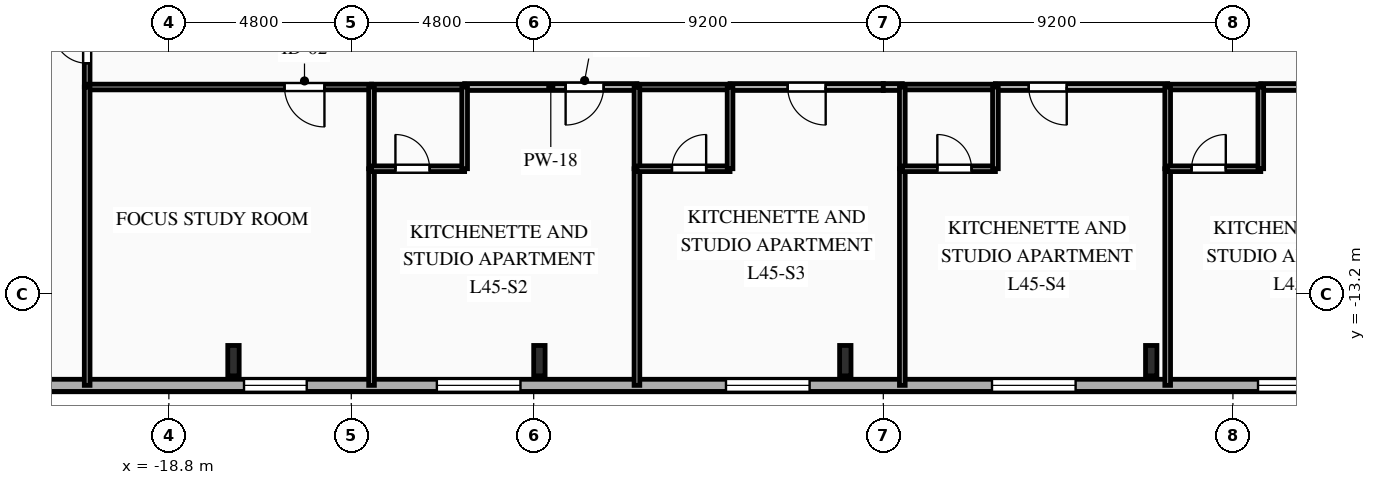
"""IFC4 building model, lengths in metres.
Left out: names, types, materials, properties, quantities, classifications, styles, units other than length and angle.
Written with IfcOpenShell. Run it as: python <this file> out.ifc"""

import sys

from ifc_helpers import new_model, si_unit, direction, frame, frame_2d, origin, origin_2d, place, context, subcontext, project, spatial, rectangle, i_section, extrude, element, fill, save


model = new_model("IFC4")
c1 = context("Model", 3, precision=1e-05, world=origin(), true_north=direction((0.0, 1.0)))
c2 = subcontext(c1, "Body", "Model", "MODEL_VIEW")
j1 = project(units=[si_unit("LENGTHUNIT", "METRE"), si_unit("PLANEANGLEUNIT", "RADIAN")], contexts=[c1])
p1 = place(None, origin())
s1 = spatial("IfcSite", under=j1, at=p1, CompositionType="ELEMENT")
p2 = place(p1, origin())
s2 = spatial("IfcBuilding", under=s1, at=p2, CompositionType="ELEMENT")
p3 = place(p2, frame((0.0, 0.0, 161.15)))
s3 = spatial("IfcBuildingStorey", under=s2, at=p3, CompositionType="ELEMENT", Elevation=161.15)
for number, where, z_axis, x_axis in (
    (1, (-17.1, -14.95, 0.0), (0.0, 0.0, 1.0), (1.0, 0.0, 0.0)),
    (2, (-9.05, -14.95, 0.0), (0.0, 0.0, 1.0), (1.0, 0.0, 0.0)),
    (3, (-1.0, -14.95, 0.0), (0.0, 0.0, 1.0), (1.0, 0.0, 0.0)),
    (4, (7.05, -14.95, 0.0), (0.0, 0.0, 1.0), (1.0, 0.0, 0.0)),
):
    element("IfcColumn", number, at=place(p3, frame(where, z_axis=z_axis, x_axis=x_axis)), inside=s3, PredefinedType="COLUMN", context=c2, shape_type="SweptSolid", body=[
        extrude(i_section(OverallWidth=0.3, OverallDepth=0.8, WebThickness=0.018, FlangeThickness=0.033, FilletRadius=0.03, at=origin_2d()), origin(), (0.0, 0.0, 1.0), 3.35),
    ])
p4 = place(p3, frame((23.8, -15.6, 0.0), z_axis=(0.0, 0.0, 1.0), x_axis=(-1.0, 0.0, 0.0)))
e5 = element("IfcWall", 5, at=p4, inside=s3, PredefinedType="SOLIDWALL", context=c2, shape_type="SweptSolid", body=[
    extrude(rectangle(XDim=49.6, YDim=0.32, at=frame_2d((24.8, 0.0))), origin(), (0.0, 0.0, 1.0), 3.04),
])
p5 = place(p4, frame((1.13, 0.0, 0.85)))
e6 = element("IfcOpeningElement", 6, at=p5, cuts=e5, PredefinedType="OPENING", context=c2, shape_type="SweptSolid", body=[
    extrude(rectangle(XDim=1.1, YDim=1.85, at=frame_2d((0.55, 0.925))), frame((0.0, 0.17, 0.0), z_axis=(0.0, -1.0, 0.0), x_axis=(1.0, 0.0, 0.0)), (0.0, 0.0, 1.0), 0.34),
])
p6 = place(p4, frame((5.295, 0.0, 0.85)))
e7 = element("IfcOpeningElement", 7, at=p6, cuts=e5, PredefinedType="OPENING", context=c2, shape_type="SweptSolid", body=[
    extrude(rectangle(XDim=1.65, YDim=1.85, at=frame_2d((0.825, 0.925))), frame((0.0, 0.17, 0.0), z_axis=(0.0, -1.0, 0.0), x_axis=(1.0, 0.0, 0.0)), (0.0, 0.0, 1.0), 0.34),
])
p7 = place(p4, frame((11.74, 0.0, 0.85)))
e8 = element("IfcOpeningElement", 8, at=p7, cuts=e5, PredefinedType="OPENING", context=c2, shape_type="SweptSolid", body=[
    extrude(rectangle(XDim=2.2, YDim=1.85, at=frame_2d((1.1, 0.925))), frame((0.0, 0.17, 0.0), z_axis=(0.0, -1.0, 0.0), x_axis=(1.0, 0.0, 0.0)), (0.0, 0.0, 1.0), 0.34),
])
p8 = place(p4, frame((18.74, 0.0, 0.85)))
e9 = element("IfcOpeningElement", 9, at=p8, cuts=e5, PredefinedType="OPENING", context=c2, shape_type="SweptSolid", body=[
    extrude(rectangle(XDim=2.2, YDim=1.85, at=frame_2d((1.1, 0.925))), frame((0.0, 0.17, 0.0), z_axis=(0.0, -1.0, 0.0), x_axis=(1.0, 0.0, 0.0)), (0.0, 0.0, 1.0), 0.34),
])
p9 = place(p4, frame((25.74, 0.0, 0.85)))
e10 = element("IfcOpeningElement", 10, at=p9, cuts=e5, PredefinedType="OPENING", context=c2, shape_type="SweptSolid", body=[
    extrude(rectangle(XDim=2.2, YDim=1.85, at=frame_2d((1.1, 0.925))), frame((0.0, 0.17, 0.0), z_axis=(0.0, -1.0, 0.0), x_axis=(1.0, 0.0, 0.0)), (0.0, 0.0, 1.0), 0.34),
])
p10 = place(p4, frame((33.348, 0.0, 0.85)))
e11 = element("IfcOpeningElement", 11, at=p10, cuts=e5, PredefinedType="OPENING", context=c2, shape_type="SweptSolid", body=[
    extrude(rectangle(XDim=2.2, YDim=1.85, at=frame_2d((1.1, 0.925))), frame((0.0, 0.17, 0.0), z_axis=(0.0, -1.0, 0.0), x_axis=(1.0, 0.0, 0.0)), (0.0, 0.0, 1.0), 0.34),
])
p11 = place(p4, frame((38.972, 0.0, 0.85)))
e12 = element("IfcOpeningElement", 12, at=p11, cuts=e5, PredefinedType="OPENING", context=c2, shape_type="SweptSolid", body=[
    extrude(rectangle(XDim=1.65, YDim=1.85, at=frame_2d((0.825, 0.925))), frame((0.0, 0.17, 0.0), z_axis=(0.0, -1.0, 0.0), x_axis=(1.0, 0.0, 0.0)), (0.0, 0.0, 1.0), 0.34),
])
p12 = place(p4, frame((45.895, 0.0, 0.85)))
e13 = element("IfcOpeningElement", 13, at=p12, cuts=e5, PredefinedType="OPENING", context=c2, shape_type="SweptSolid", body=[
    extrude(rectangle(XDim=1.65, YDim=1.85, at=frame_2d((0.825, 0.925))), frame((0.0, 0.17, 0.0), z_axis=(0.0, -1.0, 0.0), x_axis=(1.0, 0.0, 0.0)), (0.0, 0.0, 1.0), 0.34),
])
p13 = place(p3, frame((-20.95, -7.75, 0.0), z_axis=(0.0, 0.0, 1.0), x_axis=(0.0, 1.0, 0.0)))
e14 = element("IfcWall", 14, at=p13, inside=s3, PredefinedType="PARTITIONING", context=c2, shape_type="SweptSolid", body=[
    extrude(rectangle(XDim=2.15, YDim=0.15, at=frame_2d((1.075, 0.0))), origin(), (0.0, 0.0, 1.0), 3.04),
])
p14 = place(p13, frame((0.625, 0.0, 0.0)))
e15 = element("IfcOpeningElement", 15, at=p14, cuts=e14, PredefinedType="OPENING", context=c2, shape_type="SweptSolid", body=[
    extrude(rectangle(XDim=0.9, YDim=2.1, at=frame_2d((0.45, 1.05))), frame((0.0, 0.085, 0.0), z_axis=(0.0, -1.0, 0.0), x_axis=(1.0, 0.0, 0.0)), (0.0, 0.0, 1.0), 0.17),
])
p15 = place(p3, frame((-13.467, -7.75, 0.0), z_axis=(0.0, 0.0, 1.0), x_axis=(-1.0, 0.0, 0.0)))
e16 = element("IfcWall", 16, at=p15, inside=s3, PredefinedType="PARTITIONING", context=c2, shape_type="SweptSolid", body=[
    extrude(rectangle(XDim=7.483, YDim=0.15, at=frame_2d((3.741, 0.0))), origin(), (0.0, 0.0, 1.0), 3.04),
])
p16 = place(p15, frame((1.239, 0.0, 0.0)))
e17 = element("IfcOpeningElement", 17, at=p16, cuts=e16, PredefinedType="OPENING", context=c2, shape_type="SweptSolid", body=[
    extrude(rectangle(XDim=1.05, YDim=2.15, at=frame_2d((0.525, 1.075))), frame((0.0, 0.085, 0.0), z_axis=(0.0, -1.0, 0.0), x_axis=(1.0, 0.0, 0.0)), (0.0, 0.0, 1.0), 0.17),
])
p17 = place(p3, frame((-6.483, -7.75, 0.0), z_axis=(0.0, 0.0, 1.0), x_axis=(-1.0, 0.0, 0.0)))
e18 = element("IfcWall", 18, at=p17, inside=s3, PredefinedType="PARTITIONING", context=c2, shape_type="SweptSolid", body=[
    extrude(rectangle(XDim=4.534, YDim=0.18, at=frame_2d((2.267, 0.0))), origin(), (0.0, 0.0, 1.0), 3.04),
])
p18 = place(p17, frame((0.877, 0.0, 0.0)))
e19 = element("IfcOpeningElement", 19, at=p18, cuts=e18, PredefinedType="OPENING", context=c2, shape_type="SweptSolid", body=[
    extrude(rectangle(XDim=1.0, YDim=2.15, at=frame_2d((0.5, 1.075))), frame((0.0, 0.1, 0.0), z_axis=(0.0, -1.0, 0.0), x_axis=(1.0, 0.0, 0.0)), (0.0, 0.0, 1.0), 0.2),
])
p19 = place(p3, frame((-11.017, -7.75, 0.0), z_axis=(0.0, 0.0, 1.0), x_axis=(-1.0, 0.0, 0.0)))
e20 = element("IfcWall", 20, at=p19, inside=s3, PredefinedType="PLUMBINGWALL", context=c2, shape_type="SweptSolid", body=[
    extrude(rectangle(XDim=2.45, YDim=0.15, at=frame_2d((1.225, 0.0))), origin(), (0.0, 0.0, 1.0), 3.04),
])
p20 = place(p3, frame((0.0, -7.75, 0.0), z_axis=(0.0, 0.0, 1.0), x_axis=(-1.0, 0.0, 0.0)))
e21 = element("IfcWall", 21, at=p20, inside=s3, PredefinedType="PARTITIONING", context=c2, shape_type="SweptSolid", body=[
    extrude(rectangle(XDim=4.033, YDim=0.18, at=frame_2d((2.017, 0.0))), origin(), (0.0, 0.0, 1.0), 3.04),
])
p21 = place(p20, frame((1.517, 0.0, 0.0)))
e22 = element("IfcOpeningElement", 22, at=p21, cuts=e21, PredefinedType="OPENING", context=c2, shape_type="SweptSolid", body=[
    extrude(rectangle(XDim=1.0, YDim=2.15, at=frame_2d((0.5, 1.075))), frame((0.0, 0.1, 0.0), z_axis=(0.0, -1.0, 0.0), x_axis=(1.0, 0.0, 0.0)), (0.0, 0.0, 1.0), 0.2),
])
p22 = place(p3, frame((-4.033, -7.75, 0.0), z_axis=(0.0, 0.0, 1.0), x_axis=(-1.0, 0.0, 0.0)))
e23 = element("IfcWall", 23, at=p22, inside=s3, PredefinedType="PLUMBINGWALL", context=c2, shape_type="SweptSolid", body=[
    extrude(rectangle(XDim=2.45, YDim=0.15, at=frame_2d((1.225, 0.0))), origin(), (0.0, 0.0, 1.0), 3.04),
])
p23 = place(p3, frame((0.5, -7.75, 0.0), z_axis=(0.0, 0.0, 1.0), x_axis=(-1.0, 0.0, 0.0)))
e24 = element("IfcWall", 24, at=p23, inside=s3, PredefinedType="PARTITIONING", context=c2, shape_type="SweptSolid", body=[
    extrude(rectangle(XDim=0.5, YDim=0.18, at=frame_2d((0.25, 0.0))), origin(), (0.0, 0.0, 1.0), 3.04),
])
p24 = place(p3, frame((7.483, -7.75, 0.0), z_axis=(0.0, 0.0, 1.0), x_axis=(-1.0, 0.0, 0.0)))
e25 = element("IfcWall", 25, at=p24, inside=s3, PredefinedType="PARTITIONING", context=c2, shape_type="SweptSolid", body=[
    extrude(rectangle(XDim=4.533, YDim=0.18, at=frame_2d((2.267, 0.0))), origin(), (0.0, 0.0, 1.0), 3.04),
])
p25 = place(p24, frame((2.656, 0.0, 0.0)))
e26 = element("IfcOpeningElement", 26, at=p25, cuts=e25, PredefinedType="OPENING", context=c2, shape_type="SweptSolid", body=[
    extrude(rectangle(XDim=1.0, YDim=2.15, at=frame_2d((0.5, 1.075))), frame((0.0, 0.1, 0.0), z_axis=(0.0, -1.0, 0.0), x_axis=(1.0, 0.0, 0.0)), (0.0, 0.0, 1.0), 0.2),
])
p26 = place(p3, frame((2.95, -7.75, 0.0), z_axis=(0.0, 0.0, 1.0), x_axis=(-1.0, 0.0, 0.0)))
e27 = element("IfcWall", 27, at=p26, inside=s3, PredefinedType="PLUMBINGWALL", context=c2, shape_type="SweptSolid", body=[
    extrude(rectangle(XDim=2.45, YDim=0.15, at=frame_2d((1.225, 0.0))), origin(), (0.0, 0.0, 1.0), 3.04),
])
p27 = place(p3, frame((14.467, -7.75, 0.0), z_axis=(0.0, 0.0, 1.0), x_axis=(-1.0, 0.0, 0.0)))
e28 = element("IfcWall", 28, at=p27, inside=s3, PredefinedType="PARTITIONING", context=c2, shape_type="SweptSolid", body=[
    extrude(rectangle(XDim=4.534, YDim=0.18, at=frame_2d((2.267, 0.0))), origin(), (0.0, 0.0, 1.0), 3.04),
])
p28 = place(p27, frame((0.877, 0.0, 0.0)))
e29 = element("IfcOpeningElement", 29, at=p28, cuts=e28, PredefinedType="OPENING", context=c2, shape_type="SweptSolid", body=[
    extrude(rectangle(XDim=1.0, YDim=2.15, at=frame_2d((0.5, 1.075))), frame((0.0, 0.1, 0.0), z_axis=(0.0, -1.0, 0.0), x_axis=(1.0, 0.0, 0.0)), (0.0, 0.0, 1.0), 0.2),
])
p29 = place(p3, frame((9.933, -7.75, 0.0), z_axis=(0.0, 0.0, 1.0), x_axis=(-1.0, 0.0, 0.0)))
e30 = element("IfcWall", 30, at=p29, inside=s3, PredefinedType="PLUMBINGWALL", context=c2, shape_type="SweptSolid", body=[
    extrude(rectangle(XDim=2.45, YDim=0.15, at=frame_2d((1.225, 0.0))), origin(), (0.0, 0.0, 1.0), 3.04),
])
p30 = place(p3, frame((-20.95, -7.75, 0.0), z_axis=(0.0, 0.0, 1.0), x_axis=(0.0, -1.0, 0.0)))
e31 = element("IfcWall", 31, at=p30, inside=s3, PredefinedType="PARTITIONING", context=c2, shape_type="SweptSolid", body=[
    extrude(rectangle(XDim=7.85, YDim=0.15, at=frame_2d((3.925, 0.0))), origin(), (0.0, 0.0, 1.0), 3.04),
])
p31 = place(p3, frame((-13.467, -9.9, 0.0), z_axis=(0.0, 0.0, 1.0), x_axis=(0.0, -1.0, 0.0)))
e32 = element("IfcWall", 32, at=p31, inside=s3, PredefinedType="PARTITIONING", context=c2, shape_type="SweptSolid", body=[
    extrude(rectangle(XDim=5.7, YDim=0.15, at=frame_2d((2.85, 0.0))), origin(), (0.0, 0.0, 1.0), 3.04),
])
p32 = place(p3, frame((-13.467, -7.75, 0.0), z_axis=(0.0, 0.0, 1.0), x_axis=(0.0, -1.0, 0.0)))
e33 = element("IfcWall", 33, at=p32, inside=s3, PredefinedType="PLUMBINGWALL", context=c2, shape_type="SweptSolid", body=[
    extrude(rectangle(XDim=2.15, YDim=0.15, at=frame_2d((1.075, 0.0))), origin(), (0.0, 0.0, 1.0), 3.04),
])
p33 = place(p3, frame((-13.467, -9.9, 0.0), z_axis=(0.0, 0.0, 1.0), x_axis=(1.0, 0.0, 0.0)))
e34 = element("IfcWall", 34, at=p33, inside=s3, PredefinedType="PLUMBINGWALL", context=c2, shape_type="SweptSolid", body=[
    extrude(rectangle(XDim=2.45, YDim=0.15, at=frame_2d((1.225, 0.0))), origin(), (0.0, 0.0, 1.0), 3.04),
])
p34 = place(p33, frame((0.629, 0.0, 0.0)))
e35 = element("IfcOpeningElement", 35, at=p34, cuts=e34, PredefinedType="OPENING", context=c2, shape_type="SweptSolid", body=[
    extrude(rectangle(XDim=0.9, YDim=2.1, at=frame_2d((0.45, 1.05))), frame((0.0, 0.085, 0.0), z_axis=(0.0, -1.0, 0.0), x_axis=(1.0, 0.0, 0.0)), (0.0, 0.0, 1.0), 0.17),
])
p35 = place(p3, frame((-11.017, -9.9, 0.0), z_axis=(0.0, 0.0, 1.0), x_axis=(0.0, 1.0, 0.0)))
e36 = element("IfcWall", 36, at=p35, inside=s3, PredefinedType="PLUMBINGWALL", context=c2, shape_type="SweptSolid", body=[
    extrude(rectangle(XDim=2.15, YDim=0.15, at=frame_2d((1.075, 0.0))), origin(), (0.0, 0.0, 1.0), 3.04),
])
p36 = place(p3, frame((-6.483, -9.9, 0.0), z_axis=(0.0, 0.0, 1.0), x_axis=(0.0, -1.0, 0.0)))
e37 = element("IfcWall", 37, at=p36, inside=s3, PredefinedType="PARTITIONING", context=c2, shape_type="SweptSolid", body=[
    extrude(rectangle(XDim=5.7, YDim=0.15, at=frame_2d((2.85, 0.0))), origin(), (0.0, 0.0, 1.0), 3.04),
])
p37 = place(p3, frame((-6.483, -7.75, 0.0), z_axis=(0.0, 0.0, 1.0), x_axis=(0.0, -1.0, 0.0)))
e38 = element("IfcWall", 38, at=p37, inside=s3, PredefinedType="PLUMBINGWALL", context=c2, shape_type="SweptSolid", body=[
    extrude(rectangle(XDim=2.15, YDim=0.15, at=frame_2d((1.075, 0.0))), origin(), (0.0, 0.0, 1.0), 3.04),
])
p38 = place(p3, frame((-6.483, -9.9, 0.0), z_axis=(0.0, 0.0, 1.0), x_axis=(1.0, 0.0, 0.0)))
e39 = element("IfcWall", 39, at=p38, inside=s3, PredefinedType="PLUMBINGWALL", context=c2, shape_type="SweptSolid", body=[
    extrude(rectangle(XDim=2.45, YDim=0.15, at=frame_2d((1.225, 0.0))), origin(), (0.0, 0.0, 1.0), 3.04),
])
p39 = place(p38, frame((0.921, 0.0, 0.0)))
e40 = element("IfcOpeningElement", 40, at=p39, cuts=e39, PredefinedType="OPENING", context=c2, shape_type="SweptSolid", body=[
    extrude(rectangle(XDim=0.9, YDim=2.1, at=frame_2d((0.45, 1.05))), frame((0.0, 0.085, 0.0), z_axis=(0.0, -1.0, 0.0), x_axis=(1.0, 0.0, 0.0)), (0.0, 0.0, 1.0), 0.17),
])
p40 = place(p3, frame((-4.033, -9.9, 0.0), z_axis=(0.0, 0.0, 1.0), x_axis=(0.0, 1.0, 0.0)))
e41 = element("IfcWall", 41, at=p40, inside=s3, PredefinedType="PLUMBINGWALL", context=c2, shape_type="SweptSolid", body=[
    extrude(rectangle(XDim=2.15, YDim=0.15, at=frame_2d((1.075, 0.0))), origin(), (0.0, 0.0, 1.0), 3.04),
])
p41 = place(p3, frame((0.5, -9.9, 0.0), z_axis=(0.0, 0.0, 1.0), x_axis=(0.0, -1.0, 0.0)))
e42 = element("IfcWall", 42, at=p41, inside=s3, PredefinedType="PARTITIONING", context=c2, shape_type="SweptSolid", body=[
    extrude(rectangle(XDim=5.7, YDim=0.15, at=frame_2d((2.85, 0.0))), origin(), (0.0, 0.0, 1.0), 3.04),
])
p42 = place(p3, frame((0.5, -7.75, 0.0), z_axis=(0.0, 0.0, 1.0), x_axis=(0.0, -1.0, 0.0)))
e43 = element("IfcWall", 43, at=p42, inside=s3, PredefinedType="PLUMBINGWALL", context=c2, shape_type="SweptSolid", body=[
    extrude(rectangle(XDim=2.15, YDim=0.15, at=frame_2d((1.075, 0.0))), origin(), (0.0, 0.0, 1.0), 3.04),
])
p43 = place(p3, frame((0.5, -9.9, 0.0), z_axis=(0.0, 0.0, 1.0), x_axis=(1.0, 0.0, 0.0)))
e44 = element("IfcWall", 44, at=p43, inside=s3, PredefinedType="PLUMBINGWALL", context=c2, shape_type="SweptSolid", body=[
    extrude(rectangle(XDim=2.45, YDim=0.15, at=frame_2d((1.225, 0.0))), origin(), (0.0, 0.0, 1.0), 3.04),
])
p44 = place(p43, frame((0.921, 0.0, 0.0)))
e45 = element("IfcOpeningElement", 45, at=p44, cuts=e44, PredefinedType="OPENING", context=c2, shape_type="SweptSolid", body=[
    extrude(rectangle(XDim=0.9, YDim=2.1, at=frame_2d((0.45, 1.05))), frame((0.0, 0.085, 0.0), z_axis=(0.0, -1.0, 0.0), x_axis=(1.0, 0.0, 0.0)), (0.0, 0.0, 1.0), 0.17),
])
p45 = place(p3, frame((2.95, -9.9, 0.0), z_axis=(0.0, 0.0, 1.0), x_axis=(0.0, 1.0, 0.0)))
e46 = element("IfcWall", 46, at=p45, inside=s3, PredefinedType="PLUMBINGWALL", context=c2, shape_type="SweptSolid", body=[
    extrude(rectangle(XDim=2.15, YDim=0.15, at=frame_2d((1.075, 0.0))), origin(), (0.0, 0.0, 1.0), 3.04),
])
p46 = place(p3, frame((7.483, -9.9, 0.0), z_axis=(0.0, 0.0, 1.0), x_axis=(0.0, -1.0, 0.0)))
e47 = element("IfcWall", 47, at=p46, inside=s3, PredefinedType="PARTITIONING", context=c2, shape_type="SweptSolid", body=[
    extrude(rectangle(XDim=5.7, YDim=0.15, at=frame_2d((2.85, 0.0))), origin(), (0.0, 0.0, 1.0), 2.525),
])
p47 = place(p3, frame((7.483, -7.75, 0.0), z_axis=(0.0, 0.0, 1.0), x_axis=(0.0, -1.0, 0.0)))
e48 = element("IfcWall", 48, at=p47, inside=s3, PredefinedType="PLUMBINGWALL", context=c2, shape_type="SweptSolid", body=[
    extrude(rectangle(XDim=2.15, YDim=0.15, at=frame_2d((1.075, 0.0))), origin(), (0.0, 0.0, 1.0), 3.04),
])
p48 = place(p3, frame((7.483, -9.9, 0.0), z_axis=(0.0, 0.0, 1.0), x_axis=(1.0, 0.0, 0.0)))
e49 = element("IfcWall", 49, at=p48, inside=s3, PredefinedType="PLUMBINGWALL", context=c2, shape_type="SweptSolid", body=[
    extrude(rectangle(XDim=2.45, YDim=0.15, at=frame_2d((1.225, 0.0))), origin(), (0.0, 0.0, 1.0), 3.04),
])
p49 = place(p48, frame((0.629, 0.0, 0.0)))
e50 = element("IfcOpeningElement", 50, at=p49, cuts=e49, PredefinedType="OPENING", context=c2, shape_type="SweptSolid", body=[
    extrude(rectangle(XDim=0.9, YDim=2.1, at=frame_2d((0.45, 1.05))), frame((0.0, 0.085, 0.0), z_axis=(0.0, -1.0, 0.0), x_axis=(1.0, 0.0, 0.0)), (0.0, 0.0, 1.0), 0.17),
])
p50 = place(p3, frame((9.933, -9.9, 0.0), z_axis=(0.0, 0.0, 1.0), x_axis=(0.0, 1.0, 0.0)))
e51 = element("IfcWall", 51, at=p50, inside=s3, PredefinedType="PLUMBINGWALL", context=c2, shape_type="SweptSolid", body=[
    extrude(rectangle(XDim=2.15, YDim=0.15, at=frame_2d((1.075, 0.0))), origin(), (0.0, 0.0, 1.0), 3.04),
])
p51 = place(p7, origin())
e52 = element("IfcWindow", 52, at=p51, inside=s3, PartitioningType="SINGLE_PANEL", PredefinedType="WINDOW", context=c2, shape_type="SweptSolid", body=[
    extrude(rectangle(XDim=2.2, YDim=1.85, at=frame_2d((1.1, 0.925))), frame((0.0, 0.03, 0.0), z_axis=(0.0, -1.0, 0.0), x_axis=(1.0, 0.0, 0.0)), (0.0, 0.0, 1.0), 0.06),
])
fill(e8, e52)
p52 = place(p8, origin())
e53 = element("IfcWindow", 53, at=p52, inside=s3, PartitioningType="SINGLE_PANEL", PredefinedType="WINDOW", context=c2, shape_type="SweptSolid", body=[
    extrude(rectangle(XDim=2.2, YDim=1.85, at=frame_2d((1.1, 0.925))), frame((0.0, 0.03, 0.0), z_axis=(0.0, -1.0, 0.0), x_axis=(1.0, 0.0, 0.0)), (0.0, 0.0, 1.0), 0.06),
])
fill(e9, e53)
p53 = place(p9, origin())
e54 = element("IfcWindow", 54, at=p53, inside=s3, PartitioningType="SINGLE_PANEL", PredefinedType="WINDOW", context=c2, shape_type="SweptSolid", body=[
    extrude(rectangle(XDim=2.2, YDim=1.85, at=frame_2d((1.1, 0.925))), frame((0.0, 0.03, 0.0), z_axis=(0.0, -1.0, 0.0), x_axis=(1.0, 0.0, 0.0)), (0.0, 0.0, 1.0), 0.06),
])
fill(e10, e54)
p54 = place(p10, origin())
e55 = element("IfcWindow", 55, at=p54, inside=s3, PartitioningType="SINGLE_PANEL", PredefinedType="WINDOW", context=c2, shape_type="SweptSolid", body=[
    extrude(rectangle(XDim=2.2, YDim=1.85, at=frame_2d((1.1, 0.925))), frame((0.0, 0.03, 0.0), z_axis=(0.0, -1.0, 0.0), x_axis=(1.0, 0.0, 0.0)), (0.0, 0.0, 1.0), 0.06),
])
fill(e11, e55)
p55 = place(p11, origin())
e56 = element("IfcWindow", 56, at=p55, inside=s3, PartitioningType="SINGLE_PANEL", PredefinedType="WINDOW", context=c2, shape_type="SweptSolid", body=[
    extrude(rectangle(XDim=1.65, YDim=1.85, at=frame_2d((0.825, 0.925))), frame((0.0, 0.03, 0.0), z_axis=(0.0, -1.0, 0.0), x_axis=(1.0, 0.0, 0.0)), (0.0, 0.0, 1.0), 0.06),
])
fill(e12, e56)
p56 = place(p14, origin())
e57 = element("IfcDoor", 57, at=p56, inside=s3, OperationType="SINGLE_SWING_RIGHT", PredefinedType="DOOR", context=c2, shape_type="SweptSolid", body=[
    extrude(rectangle(XDim=0.9, YDim=2.1, at=frame_2d((0.45, 1.05))), frame((0.0, 0.025, 0.0), z_axis=(0.0, -1.0, 0.0), x_axis=(1.0, 0.0, 0.0)), (0.0, 0.0, 1.0), 0.05),
])
fill(e15, e57)
p57 = place(p16, origin())
e58 = element("IfcDoor", 58, at=p57, inside=s3, OperationType="SINGLE_SWING_LEFT", PredefinedType="DOOR", context=c2, shape_type="SweptSolid", body=[
    extrude(rectangle(XDim=1.05, YDim=2.15, at=frame_2d((0.525, 1.075))), frame((0.0, 0.025, 0.0), z_axis=(0.0, -1.0, 0.0), x_axis=(1.0, 0.0, 0.0)), (0.0, 0.0, 1.0), 0.05),
])
fill(e17, e58)
p58 = place(p18, origin())
e59 = element("IfcDoor", 59, at=p58, inside=s3, OperationType="SINGLE_SWING_RIGHT", PredefinedType="DOOR", context=c2, shape_type="SweptSolid", body=[
    extrude(rectangle(XDim=1.0, YDim=2.15, at=frame_2d((0.5, 1.075))), frame((0.0, 0.025, 0.0), z_axis=(0.0, -1.0, 0.0), x_axis=(1.0, 0.0, 0.0)), (0.0, 0.0, 1.0), 0.05),
])
fill(e19, e59)
p59 = place(p21, origin())
e60 = element("IfcDoor", 60, at=p59, inside=s3, OperationType="SINGLE_SWING_LEFT", PredefinedType="DOOR", context=c2, shape_type="SweptSolid", body=[
    extrude(rectangle(XDim=1.0, YDim=2.15, at=frame_2d((0.5, 1.075))), frame((0.0, 0.025, 0.0), z_axis=(0.0, -1.0, 0.0), x_axis=(1.0, 0.0, 0.0)), (0.0, 0.0, 1.0), 0.05),
])
fill(e22, e60)
p60 = place(p25, origin())
e61 = element("IfcDoor", 61, at=p60, inside=s3, OperationType="SINGLE_SWING_LEFT", PredefinedType="DOOR", context=c2, shape_type="SweptSolid", body=[
    extrude(rectangle(XDim=1.0, YDim=2.15, at=frame_2d((0.5, 1.075))), frame((0.0, 0.025, 0.0), z_axis=(0.0, -1.0, 0.0), x_axis=(1.0, 0.0, 0.0)), (0.0, 0.0, 1.0), 0.05),
])
fill(e26, e61)
p61 = place(p34, origin())
e62 = element("IfcDoor", 62, at=p61, inside=s3, OperationType="SINGLE_SWING_LEFT", PredefinedType="DOOR", context=c2, shape_type="SweptSolid", body=[
    extrude(rectangle(XDim=0.9, YDim=2.1, at=frame_2d((0.45, 1.05))), frame((0.0, 0.025, 0.0), z_axis=(0.0, -1.0, 0.0), x_axis=(1.0, 0.0, 0.0)), (0.0, 0.0, 1.0), 0.05),
])
fill(e35, e62)
p62 = place(p39, origin())
e63 = element("IfcDoor", 63, at=p62, inside=s3, OperationType="SINGLE_SWING_RIGHT", PredefinedType="DOOR", context=c2, shape_type="SweptSolid", body=[
    extrude(rectangle(XDim=0.9, YDim=2.1, at=frame_2d((0.45, 1.05))), frame((0.0, 0.025, 0.0), z_axis=(0.0, -1.0, 0.0), x_axis=(1.0, 0.0, 0.0)), (0.0, 0.0, 1.0), 0.05),
])
fill(e40, e63)
p63 = place(p44, origin())
e64 = element("IfcDoor", 64, at=p63, inside=s3, OperationType="SINGLE_SWING_LEFT", PredefinedType="DOOR", context=c2, shape_type="SweptSolid", body=[
    extrude(rectangle(XDim=0.9, YDim=2.1, at=frame_2d((0.45, 1.05))), frame((0.0, 0.025, 0.0), z_axis=(0.0, -1.0, 0.0), x_axis=(1.0, 0.0, 0.0)), (0.0, 0.0, 1.0), 0.05),
])
fill(e45, e64)
p64 = place(p49, origin())
e65 = element("IfcDoor", 65, at=p64, inside=s3, OperationType="SINGLE_SWING_RIGHT", PredefinedType="DOOR", context=c2, shape_type="SweptSolid", body=[
    extrude(rectangle(XDim=0.9, YDim=2.1, at=frame_2d((0.45, 1.05))), frame((0.0, 0.025, 0.0), z_axis=(0.0, -1.0, 0.0), x_axis=(1.0, 0.0, 0.0)), (0.0, 0.0, 1.0), 0.05),
])
fill(e50, e65)
save(model, sys.argv[1])
